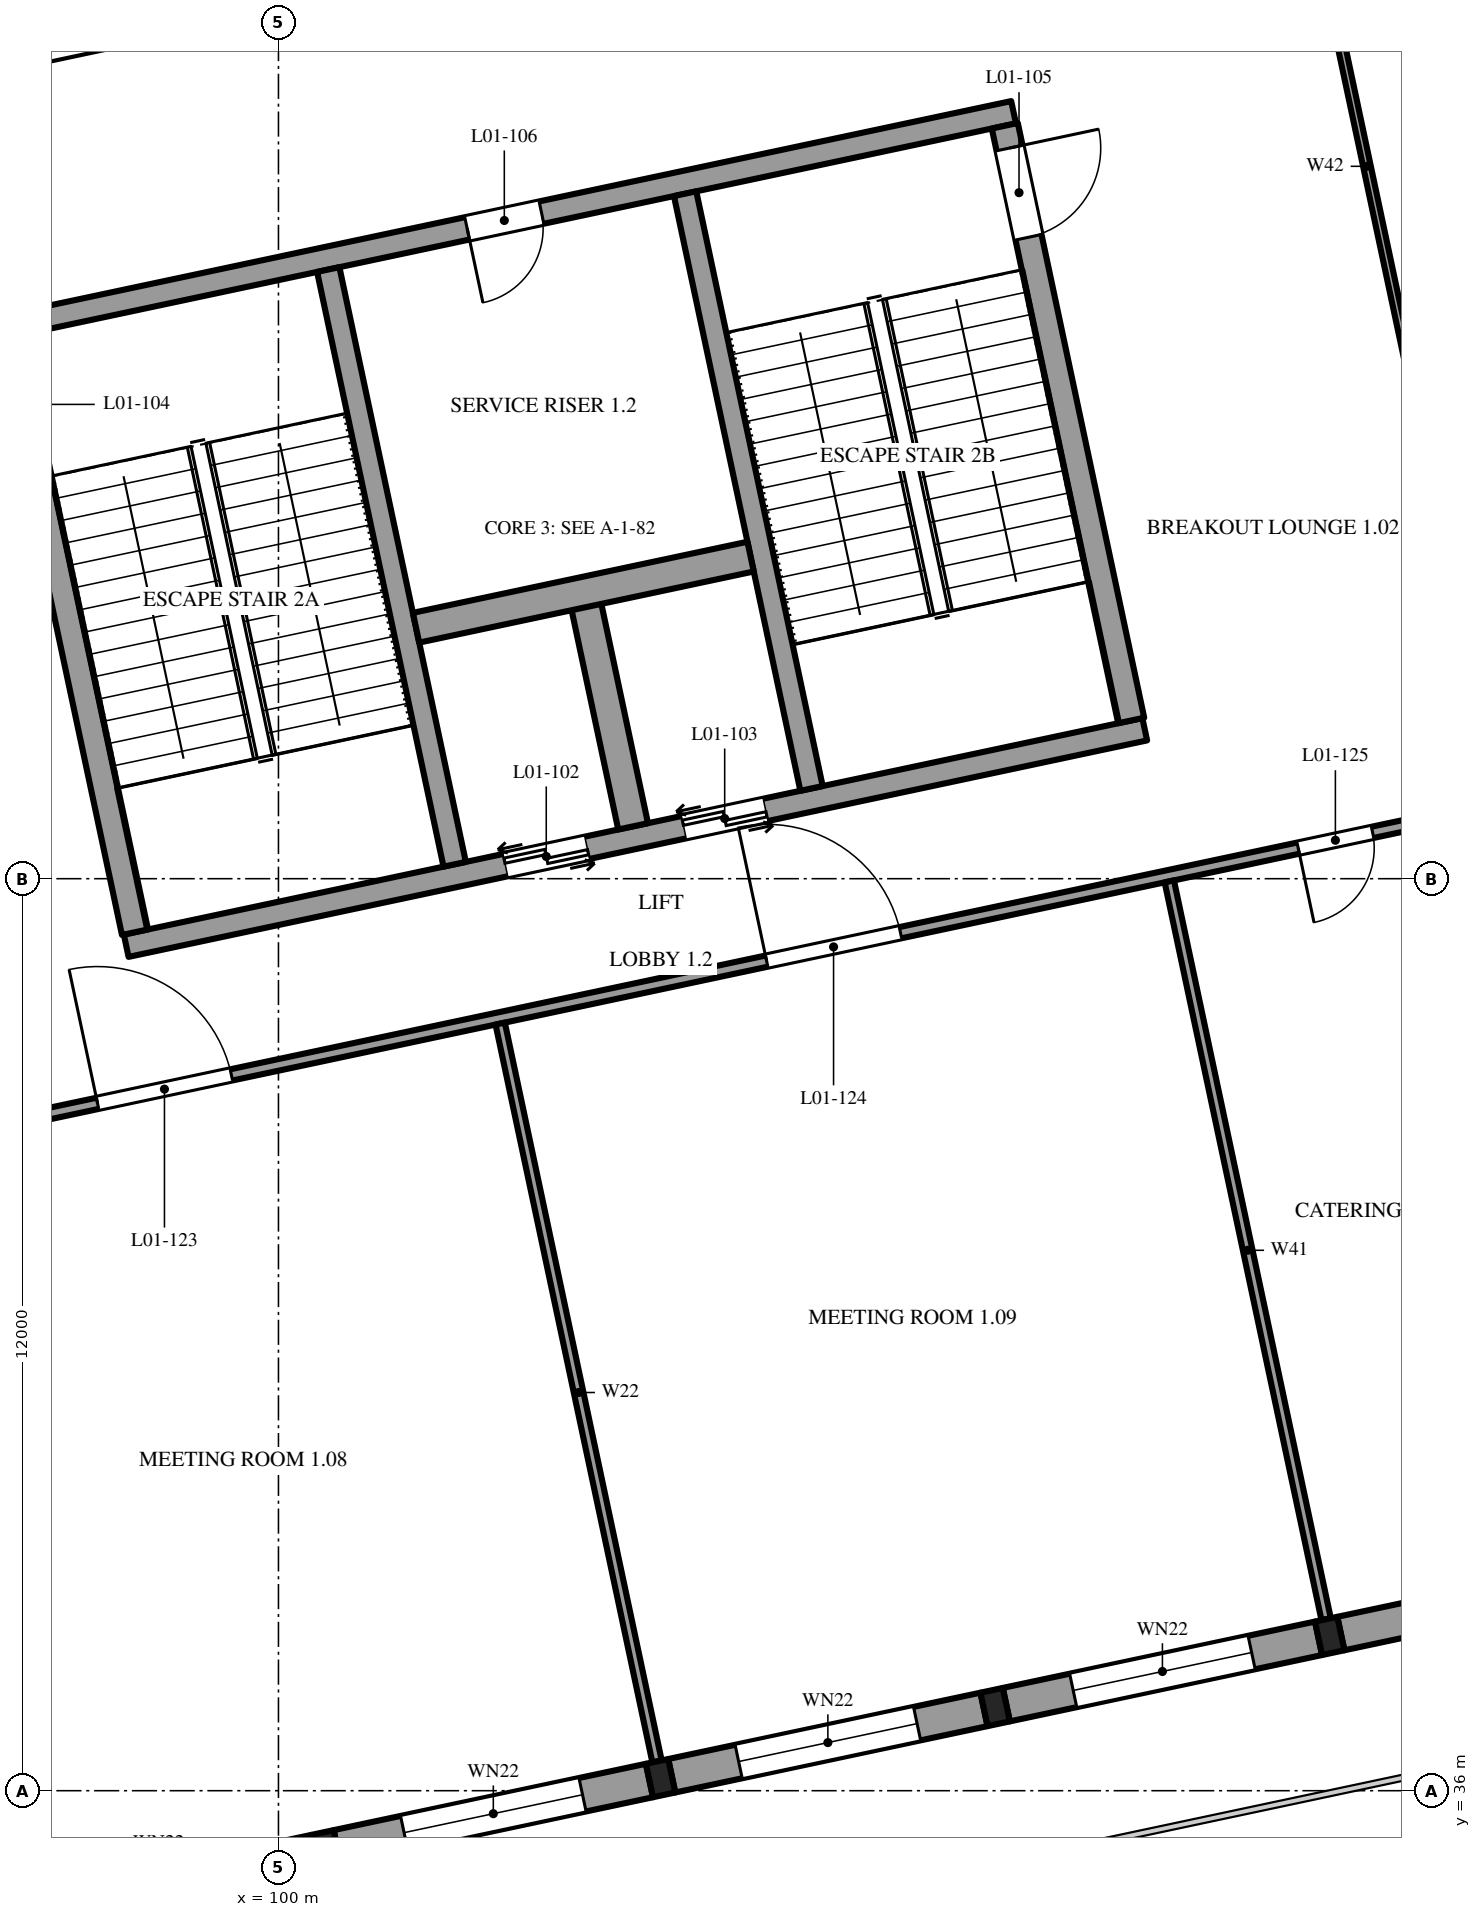
"""IFC4 building model, lengths in metres.
Left out: names, types, materials, properties, quantities, classifications, styles, units other than length and angle.
Written with IfcOpenShell. Run it as: python <this file> out.ifc"""

import sys

from ifc_helpers import new_model, si_unit, direction, frame, frame_2d, origin, origin_2d, place, context, subcontext, project, spatial, rectangle, i_section, extrude, element, fill, save


model = new_model("IFC4")
c1 = context("Model", 3, precision=1e-05, world=origin(), true_north=direction((0.0, 1.0)))
c2 = subcontext(c1, "Body", "Model", "MODEL_VIEW")
j1 = project(units=[si_unit("LENGTHUNIT", "METRE"), si_unit("PLANEANGLEUNIT", "RADIAN")], contexts=[c1])
p1 = place(None, origin())
s1 = spatial("IfcSite", under=j1, at=p1, CompositionType="ELEMENT")
p2 = place(p1, origin())
s2 = spatial("IfcBuilding", under=s1, at=p2, CompositionType="ELEMENT")
p3 = place(p2, frame((0.0, 0.0, 7.2)))
s3 = spatial("IfcBuildingStorey", under=s2, at=p3, CompositionType="ELEMENT", Elevation=7.2)
for number, where, z_axis, x_axis in (
    (1, (100.626, 35.23, 0.0), (0.0, 0.0, 1.0), (0.978, 0.208, 0.0)),
    (2, (105.028, 36.165, 0.0), (0.0, 0.0, 1.0), (0.978, 0.208, 0.0)),
    (3, (109.429, 37.101, 0.0), (0.0, 0.0, 1.0), (0.978, 0.208, 0.0)),
    (4, (113.831, 38.036, 0.0), (0.0, 0.0, 1.0), (0.978, 0.208, 0.0)),
):
    element("IfcColumn", number, at=place(p3, frame(where, z_axis=z_axis, x_axis=x_axis)), inside=s3, PredefinedType="COLUMN", context=c2, shape_type="SweptSolid", body=[
        extrude(i_section(OverallWidth=0.3, OverallDepth=0.45, WebThickness=0.014, FlangeThickness=0.026, FilletRadius=0.027, at=origin_2d()), origin(), (0.0, 0.0, 1.0), 4.8),
    ])
p4 = place(p3, frame((96.271, 55.236, 0.0), z_axis=(0.0, 0.0, 1.0), x_axis=(0.978147662755, 0.20791139903, 0.0)))
e5 = element("IfcWall", 5, at=p4, inside=s3, PredefinedType="SHEAR", context=c2, shape_type="SweptSolid", body=[
    extrude(rectangle(XDim=13.7, YDim=0.3, at=frame_2d((6.85, 0.0))), origin(), (0.0, 0.0, 1.0), 4.8),
])
p5 = place(p4, frame((6.35, 0.0, 0.0)))
e6 = element("IfcOpeningElement", 6, at=p5, cuts=e5, PredefinedType="OPENING", context=c2, shape_type="SweptSolid", body=[
    extrude(rectangle(XDim=1.0, YDim=2.1, at=frame_2d((0.5, 1.05))), frame((0.0, 0.16, 0.0), z_axis=(0.0, -1.0, 0.0), x_axis=(1.0, 0.0, 0.0)), (0.0, 0.0, 1.0), 0.32),
])
p6 = place(p3, frame((97.997, 47.118, 0.0), z_axis=(0.0, 0.0, 1.0), x_axis=(0.978147662755, 0.20791139903, 0.0)))
e7 = element("IfcWall", 7, at=p6, inside=s3, PredefinedType="SHEAR", context=c2, shape_type="SweptSolid", body=[
    extrude(rectangle(XDim=13.7, YDim=0.3, at=frame_2d((6.85, 0.0))), origin(), (0.0, 0.0, 1.0), 4.8),
])
p7 = place(p6, frame((5.1, 0.0, 0.0)))
e8 = element("IfcOpeningElement", 8, at=p7, cuts=e7, PredefinedType="OPENING", context=c2, shape_type="SweptSolid", body=[
    extrude(rectangle(XDim=1.1, YDim=2.1, at=frame_2d((0.55, 1.05))), frame((0.0, 0.16, 0.0), z_axis=(0.0, -1.0, 0.0), x_axis=(1.0, 0.0, 0.0)), (0.0, 0.0, 1.0), 0.32),
])
p8 = place(p6, frame((7.5, 0.0, 0.0)))
e9 = element("IfcOpeningElement", 9, at=p8, cuts=e7, PredefinedType="OPENING", context=c2, shape_type="SweptSolid", body=[
    extrude(rectangle(XDim=1.1, YDim=2.1, at=frame_2d((0.55, 1.05))), frame((0.0, 0.16, 0.0), z_axis=(0.0, -1.0, 0.0), x_axis=(1.0, 0.0, 0.0)), (0.0, 0.0, 1.0), 0.32),
])
p9 = place(p3, frame((96.449, 55.121, 0.0), z_axis=(0.0, 0.0, 1.0), x_axis=(0.207915693476, -0.978146749934, 0.0)))
e10 = element("IfcWall", 10, at=p9, inside=s3, PredefinedType="SOLIDWALL", context=c2, shape_type="SweptSolid", body=[
    extrude(rectangle(XDim=8.0, YDim=0.35, at=frame_2d((4.0, 0.0))), origin(), (0.0, 0.0, 1.0), 4.8),
])
p10 = place(p9, frame((0.3, 0.0, 0.0)))
e11 = element("IfcOpeningElement", 11, at=p10, cuts=e10, PredefinedType="OPENING", context=c2, shape_type="SweptSolid", body=[
    extrude(rectangle(XDim=1.2, YDim=2.1, at=frame_2d((0.6, 1.05))), frame((0.0, 0.185, 0.0), z_axis=(0.0, -1.0, 0.0), x_axis=(1.0, 0.0, 0.0)), (0.0, 0.0, 1.0), 0.37),
])
p11 = place(p3, frame((109.556, 57.907, 0.0), z_axis=(0.0, 0.0, 1.0), x_axis=(0.207915693476, -0.978146749934, 0.0)))
e12 = element("IfcWall", 12, at=p11, inside=s3, PredefinedType="SOLIDWALL", context=c2, shape_type="SweptSolid", body=[
    extrude(rectangle(XDim=8.0, YDim=0.35, at=frame_2d((4.0, 0.0))), origin(), (0.0, 0.0, 1.0), 4.8),
])
p12 = place(p11, frame((0.3, 0.0, 0.0)))
e13 = element("IfcOpeningElement", 13, at=p12, cuts=e12, PredefinedType="OPENING", context=c2, shape_type="SweptSolid", body=[
    extrude(rectangle(XDim=1.2, YDim=2.1, at=frame_2d((0.6, 1.05))), frame((0.0, 0.185, 0.0), z_axis=(0.0, -1.0, 0.0), x_axis=(1.0, 0.0, 0.0)), (0.0, 0.0, 1.0), 0.37),
])
for number, where, z_axis, x_axis in (
    (14, (100.655, 56.015, 0.0), (0.0, 0.0, 1.0), (0.208, -0.978, 0.0)),
    (15, (105.35, 57.013, 0.0), (0.0, 0.0, 1.0), (0.208, -0.978, 0.0)),
):
    element("IfcWall", number, at=place(p3, frame(where, z_axis=z_axis, x_axis=x_axis)), inside=s3, PredefinedType="SHEAR", context=c2, shape_type="SweptSolid", body=[
        extrude(rectangle(XDim=8.0, YDim=0.3, at=frame_2d((4.0, 0.0))), origin(), (0.0, 0.0, 1.0), 4.8),
    ])
p13 = place(p3, frame((104.042, 51.623, 0.0), z_axis=(0.0, 0.0, 1.0), x_axis=(0.207917150959, -0.978146440129, 0.0)))
e16 = element("IfcWall", 16, at=p13, inside=s3, PredefinedType="SHEAR", context=c2, shape_type="SweptSolid", body=[
    extrude(rectangle(XDim=3.0, YDim=0.4, at=frame_2d((1.5, 0.0))), origin(), (0.0, 0.0, 1.0), 4.8),
])
p14 = place(p3, frame((101.81, 51.302, 0.0), z_axis=(0.0, 0.0, 1.0), x_axis=(0.978138577198, 0.207954138688, 0.0)))
e17 = element("IfcWall", 17, at=p14, inside=s3, PredefinedType="SHEAR", context=c2, shape_type="SweptSolid", body=[
    extrude(rectangle(XDim=4.5, YDim=0.4, at=frame_2d((2.25, 0.0))), origin(), (0.0, 0.0, 1.0), 4.8),
])
p15 = place(p3, frame((96.371, 34.325, 0.0), z_axis=(0.0, 0.0, 1.0), x_axis=(0.978143927149, 0.207928972925, 0.0)))
e18 = element("IfcWall", 18, at=p15, inside=s3, PredefinedType="SOLIDWALL", context=c2, shape_type="SweptSolid", body=[
    extrude(rectangle(XDim=4.2, YDim=0.45, at=frame_2d((2.1, 0.0))), origin(), (0.0, 0.0, 1.0), 4.35),
])
p16 = place(p15, frame((0.9, 0.0, 0.9)))
e19 = element("IfcOpeningElement", 19, at=p16, cuts=e18, PredefinedType="OPENING", context=c2, shape_type="SweptSolid", body=[
    extrude(rectangle(XDim=2.4, YDim=2.4, at=frame_2d((1.2, 1.2))), frame((0.0, 0.235, 0.0), z_axis=(0.0, -1.0, 0.0), x_axis=(1.0, 0.0, 0.0)), (0.0, 0.0, 1.0), 0.47),
])
p17 = place(p3, frame((100.773, 35.261, 0.0), z_axis=(0.0, 0.0, 1.0), x_axis=(0.978143927149, 0.207928972925, 0.0)))
e20 = element("IfcWall", 20, at=p17, inside=s3, PredefinedType="SOLIDWALL", context=c2, shape_type="SweptSolid", body=[
    extrude(rectangle(XDim=4.2, YDim=0.45, at=frame_2d((2.1, 0.0))), origin(), (0.0, 0.0, 1.0), 4.35),
])
p18 = place(p17, frame((0.9, 0.0, 0.9)))
e21 = element("IfcOpeningElement", 21, at=p18, cuts=e20, PredefinedType="OPENING", context=c2, shape_type="SweptSolid", body=[
    extrude(rectangle(XDim=2.4, YDim=2.4, at=frame_2d((1.2, 1.2))), frame((0.0, 0.235, 0.0), z_axis=(0.0, -1.0, 0.0), x_axis=(1.0, 0.0, 0.0)), (0.0, 0.0, 1.0), 0.47),
])
p19 = place(p3, frame((105.174, 36.197, 0.0), z_axis=(0.0, 0.0, 1.0), x_axis=(0.978155748334, 0.207873355681, 0.0)))
e22 = element("IfcWall", 22, at=p19, inside=s3, PredefinedType="SOLIDWALL", context=c2, shape_type="SweptSolid", body=[
    extrude(rectangle(XDim=4.2, YDim=0.45, at=frame_2d((2.1, 0.0))), origin(), (0.0, 0.0, 1.0), 4.35),
])
p20 = place(p19, frame((0.9, 0.0, 0.9)))
e23 = element("IfcOpeningElement", 23, at=p20, cuts=e22, PredefinedType="OPENING", context=c2, shape_type="SweptSolid", body=[
    extrude(rectangle(XDim=2.4, YDim=2.4, at=frame_2d((1.2, 1.2))), frame((0.0, 0.235, 0.0), z_axis=(0.0, -1.0, 0.0), x_axis=(1.0, 0.0, 0.0)), (0.0, 0.0, 1.0), 0.47),
])
p21 = place(p3, frame((109.576, 37.132, 0.0), z_axis=(0.0, 0.0, 1.0), x_axis=(0.978146440129, 0.207917150959, 0.0)))
e24 = element("IfcWall", 24, at=p21, inside=s3, PredefinedType="SOLIDWALL", context=c2, shape_type="SweptSolid", body=[
    extrude(rectangle(XDim=4.2, YDim=0.45, at=frame_2d((2.1, 0.0))), origin(), (0.0, 0.0, 1.0), 4.35),
])
p22 = place(p21, frame((0.9, 0.0, 0.9)))
e25 = element("IfcOpeningElement", 25, at=p22, cuts=e24, PredefinedType="OPENING", context=c2, shape_type="SweptSolid", body=[
    extrude(rectangle(XDim=2.4, YDim=2.4, at=frame_2d((1.2, 1.2))), frame((0.0, 0.235, 0.0), z_axis=(0.0, -1.0, 0.0), x_axis=(1.0, 0.0, 0.0)), (0.0, 0.0, 1.0), 0.47),
])
p23 = place(p3, frame((113.978, 38.068, 0.0), z_axis=(0.0, 0.0, 1.0), x_axis=(0.978143927149, 0.207928972925, 0.0)))
e26 = element("IfcWall", 26, at=p23, inside=s3, PredefinedType="SOLIDWALL", context=c2, shape_type="SweptSolid", body=[
    extrude(rectangle(XDim=4.2, YDim=0.45, at=frame_2d((2.1, 0.0))), origin(), (0.0, 0.0, 1.0), 4.35),
])
p24 = place(p23, frame((0.9, 0.0, 0.9)))
e27 = element("IfcOpeningElement", 27, at=p24, cuts=e26, PredefinedType="OPENING", context=c2, shape_type="SweptSolid", body=[
    extrude(rectangle(XDim=2.4, YDim=2.4, at=frame_2d((1.2, 1.2))), frame((0.0, 0.235, 0.0), z_axis=(0.0, -1.0, 0.0), x_axis=(1.0, 0.0, 0.0)), (0.0, 0.0, 1.0), 0.47),
])
p25 = place(p3, frame((95.783, 58.736, 0.0), z_axis=(0.0, 0.0, 1.0), x_axis=(0.978146440129, 0.207917150959, 0.0)))
e28 = element("IfcWall", 28, at=p25, inside=s3, PredefinedType="SOLIDWALL", context=c2, shape_type="SweptSolid", body=[
    extrude(rectangle(XDim=4.2, YDim=0.45, at=frame_2d((2.1, 0.0))), origin(), (0.0, 0.0, 1.0), 4.35),
])
p26 = place(p25, frame((0.9, 0.0, 0.45)))
e29 = element("IfcOpeningElement", 29, at=p26, cuts=e28, PredefinedType="OPENING", context=c2, shape_type="SweptSolid", body=[
    extrude(rectangle(XDim=2.4, YDim=3.3, at=frame_2d((1.2, 1.65))), frame((0.0, 0.235, 0.0), z_axis=(0.0, -1.0, 0.0), x_axis=(1.0, 0.0, 0.0)), (0.0, 0.0, 1.0), 0.47),
])
p27 = place(p3, frame((80.893, 41.489, 0.0), z_axis=(0.0, 0.0, 1.0), x_axis=(0.97814724207, 0.20791337819, 0.0)))
e30 = element("IfcWall", 30, at=p27, inside=s3, PredefinedType="PARTITIONING", context=c2, shape_type="SweptSolid", body=[
    extrude(rectangle(XDim=49.5, YDim=0.15, at=frame_2d((24.75, 0.0))), origin(), (0.0, 0.0, 1.0), 3.75),
])
p28 = place(p27, frame((5.85, 0.0, 0.0)))
e31 = element("IfcOpeningElement", 31, at=p28, cuts=e30, PredefinedType="OPENING", context=c2, shape_type="SweptSolid", body=[
    extrude(rectangle(XDim=1.8, YDim=2.1, at=frame_2d((0.9, 1.05))), frame((0.0, 0.085, 0.0), z_axis=(0.0, -1.0, 0.0), x_axis=(1.0, 0.0, 0.0)), (0.0, 0.0, 1.0), 0.17),
])
p29 = place(p27, frame((17.1, 0.0, 0.0)))
e32 = element("IfcOpeningElement", 32, at=p29, cuts=e30, PredefinedType="OPENING", context=c2, shape_type="SweptSolid", body=[
    extrude(rectangle(XDim=1.8, YDim=2.1, at=frame_2d((0.9, 1.05))), frame((0.0, 0.085, 0.0), z_axis=(0.0, -1.0, 0.0), x_axis=(1.0, 0.0, 0.0)), (0.0, 0.0, 1.0), 0.17),
])
p30 = place(p27, frame((26.1, 0.0, 0.0)))
e33 = element("IfcOpeningElement", 33, at=p30, cuts=e30, PredefinedType="OPENING", context=c2, shape_type="SweptSolid", body=[
    extrude(rectangle(XDim=1.8, YDim=2.1, at=frame_2d((0.9, 1.05))), frame((0.0, 0.085, 0.0), z_axis=(0.0, -1.0, 0.0), x_axis=(1.0, 0.0, 0.0)), (0.0, 0.0, 1.0), 0.17),
])
p31 = place(p27, frame((33.25, 0.0, 0.0)))
e34 = element("IfcOpeningElement", 34, at=p31, cuts=e30, PredefinedType="OPENING", context=c2, shape_type="SweptSolid", body=[
    extrude(rectangle(XDim=1.0, YDim=2.1, at=frame_2d((0.5, 1.05))), frame((0.0, 0.085, 0.0), z_axis=(0.0, -1.0, 0.0), x_axis=(1.0, 0.0, 0.0)), (0.0, 0.0, 1.0), 0.17),
])
p32 = place(p27, frame((41.7, 0.0, 0.0)))
e35 = element("IfcOpeningElement", 35, at=p32, cuts=e30, PredefinedType="OPENING", context=c2, shape_type="SweptSolid", body=[
    extrude(rectangle(XDim=2.1, YDim=2.4, at=frame_2d((1.05, 1.2))), frame((0.0, 0.085, 0.0), z_axis=(0.0, -1.0, 0.0), x_axis=(1.0, 0.0, 0.0)), (0.0, 0.0, 1.0), 0.17),
])
p33 = place(p3, frame((104.981, 36.385, 0.0), z_axis=(0.0, 0.0, 1.0), x_axis=(-0.207927890391, 0.978144157268, 0.0)))
e36 = element("IfcWall", 36, at=p33, inside=s3, PredefinedType="PARTITIONING", context=c2, shape_type="SweptSolid", body=[
    extrude(rectangle(XDim=9.925, YDim=0.125, at=frame_2d((4.963, 0.0))), origin(), (0.0, 0.0, 1.0), 3.75),
])
p34 = place(p3, frame((113.784, 38.257, 0.0), z_axis=(0.0, 0.0, 1.0), x_axis=(-0.20790935802, 0.978148096582, 0.0)))
e37 = element("IfcWall", 37, at=p34, inside=s3, PredefinedType="PARTITIONING", context=c2, shape_type="SweptSolid", body=[
    extrude(rectangle(XDim=9.925, YDim=0.125, at=frame_2d((4.962, 0.0))), origin(), (0.0, 0.0, 1.0), 3.75),
])
p35 = place(p3, frame((113.29, 62.228, 0.0), z_axis=(0.0, 0.0, 1.0), x_axis=(0.20790935802, -0.978148096582, 0.0)))
e38 = element("IfcWall", 38, at=p35, inside=s3, PredefinedType="PARTITIONING", context=c2, shape_type="SweptSolid", body=[
    extrude(rectangle(XDim=9.925, YDim=0.1, at=frame_2d((4.962, 0.0))), origin(), (0.0, 0.0, 1.0), 3.75),
])
p36 = place(p18, origin())
e39 = element("IfcWindow", 39, at=p36, inside=s3, PartitioningType="SINGLE_PANEL", PredefinedType="WINDOW", context=c2, shape_type="SweptSolid", body=[
    extrude(rectangle(XDim=2.4, YDim=2.4, at=frame_2d((1.2, 1.2))), frame((0.0, 0.03, 0.0), z_axis=(0.0, -1.0, 0.0), x_axis=(1.0, 0.0, 0.0)), (0.0, 0.0, 1.0), 0.06),
])
fill(e21, e39)
p37 = place(p20, origin())
e40 = element("IfcWindow", 40, at=p37, inside=s3, PartitioningType="SINGLE_PANEL", PredefinedType="WINDOW", context=c2, shape_type="SweptSolid", body=[
    extrude(rectangle(XDim=2.4, YDim=2.4, at=frame_2d((1.2, 1.2))), frame((0.0, 0.03, 0.0), z_axis=(0.0, -1.0, 0.0), x_axis=(1.0, 0.0, 0.0)), (0.0, 0.0, 1.0), 0.06),
])
fill(e23, e40)
p38 = place(p22, origin())
e41 = element("IfcWindow", 41, at=p38, inside=s3, PartitioningType="SINGLE_PANEL", PredefinedType="WINDOW", context=c2, shape_type="SweptSolid", body=[
    extrude(rectangle(XDim=2.4, YDim=2.4, at=frame_2d((1.2, 1.2))), frame((0.0, 0.03, 0.0), z_axis=(0.0, -1.0, 0.0), x_axis=(1.0, 0.0, 0.0)), (0.0, 0.0, 1.0), 0.06),
])
fill(e25, e41)
p39 = place(p7, frame((1.1, 0.0, 0.0), z_axis=(0.0, 0.0, 1.0), x_axis=(-1.0, 0.0, 0.0)))
e42 = element("IfcDoor", 42, at=p39, inside=s3, OperationType="DOUBLE_DOOR_SLIDING", PredefinedType="DOOR", context=c2, shape_type="SweptSolid", body=[
    extrude(rectangle(XDim=1.1, YDim=2.1, at=frame_2d((0.55, 1.05))), frame((0.0, 0.025, 0.0), z_axis=(0.0, -1.0, 0.0), x_axis=(1.0, 0.0, 0.0)), (0.0, 0.0, 1.0), 0.05),
])
fill(e8, e42)
p40 = place(p8, frame((1.1, 0.0, 0.0), z_axis=(0.0, 0.0, 1.0), x_axis=(-1.0, 0.0, 0.0)))
e43 = element("IfcDoor", 43, at=p40, inside=s3, OperationType="DOUBLE_DOOR_SLIDING", PredefinedType="DOOR", context=c2, shape_type="SweptSolid", body=[
    extrude(rectangle(XDim=1.1, YDim=2.1, at=frame_2d((0.55, 1.05))), frame((0.0, 0.025, 0.0), z_axis=(0.0, -1.0, 0.0), x_axis=(1.0, 0.0, 0.0)), (0.0, 0.0, 1.0), 0.05),
])
fill(e9, e43)
p41 = place(p12, origin())
e44 = element("IfcDoor", 44, at=p41, inside=s3, OperationType="SINGLE_SWING_RIGHT", PredefinedType="DOOR", context=c2, shape_type="SweptSolid", body=[
    extrude(rectangle(XDim=1.2, YDim=2.1, at=frame_2d((0.6, 1.05))), frame((0.0, 0.025, 0.0), z_axis=(0.0, -1.0, 0.0), x_axis=(1.0, 0.0, 0.0)), (0.0, 0.0, 1.0), 0.05),
])
fill(e13, e44)
p42 = place(p5, frame((1.0, 0.0, 0.0), z_axis=(0.0, 0.0, 1.0), x_axis=(-1.0, 0.0, 0.0)))
e45 = element("IfcDoor", 45, at=p42, inside=s3, OperationType="SINGLE_SWING_LEFT", PredefinedType="DOOR", context=c2, shape_type="SweptSolid", body=[
    extrude(rectangle(XDim=1.0, YDim=2.1, at=frame_2d((0.5, 1.05))), frame((0.0, 0.025, 0.0), z_axis=(0.0, -1.0, 0.0), x_axis=(1.0, 0.0, 0.0)), (0.0, 0.0, 1.0), 0.05),
])
fill(e6, e45)
p43 = place(p29, origin())
e46 = element("IfcDoor", 46, at=p43, inside=s3, OperationType="DOUBLE_DOOR_SINGLE_SWING", PredefinedType="DOOR", context=c2, shape_type="SweptSolid", body=[
    extrude(rectangle(XDim=1.8, YDim=2.1, at=frame_2d((0.9, 1.05))), frame((0.0, 0.025, 0.0), z_axis=(0.0, -1.0, 0.0), x_axis=(1.0, 0.0, 0.0)), (0.0, 0.0, 1.0), 0.05),
])
fill(e32, e46)
p44 = place(p30, origin())
e47 = element("IfcDoor", 47, at=p44, inside=s3, OperationType="DOUBLE_DOOR_SINGLE_SWING", PredefinedType="DOOR", context=c2, shape_type="SweptSolid", body=[
    extrude(rectangle(XDim=1.8, YDim=2.1, at=frame_2d((0.9, 1.05))), frame((0.0, 0.025, 0.0), z_axis=(0.0, -1.0, 0.0), x_axis=(1.0, 0.0, 0.0)), (0.0, 0.0, 1.0), 0.05),
])
fill(e33, e47)
p45 = place(p31, frame((1.0, 0.0, 0.0), z_axis=(0.0, 0.0, 1.0), x_axis=(-1.0, 0.0, 0.0)))
e48 = element("IfcDoor", 48, at=p45, inside=s3, OperationType="SINGLE_SWING_RIGHT", PredefinedType="DOOR", context=c2, shape_type="SweptSolid", body=[
    extrude(rectangle(XDim=1.0, YDim=2.1, at=frame_2d((0.5, 1.05))), frame((0.0, 0.025, 0.0), z_axis=(0.0, -1.0, 0.0), x_axis=(1.0, 0.0, 0.0)), (0.0, 0.0, 1.0), 0.05),
])
fill(e34, e48)
save(model, sys.argv[1])
